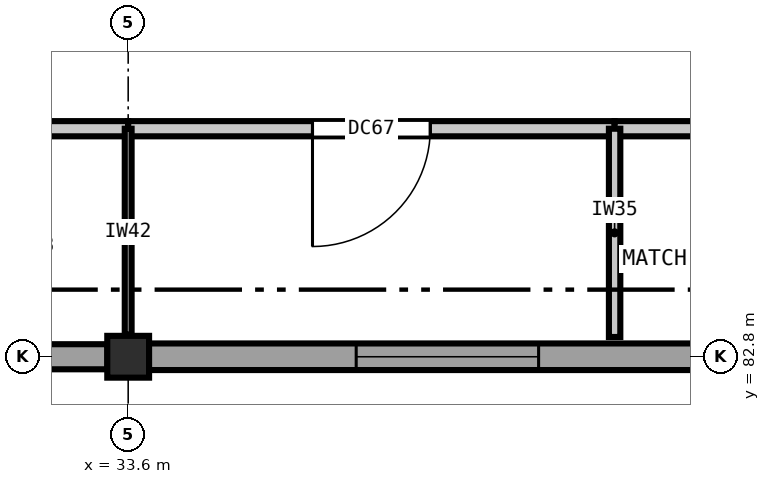
"""IFC4 building model, lengths in metres.
Left out: names, types, materials, properties, quantities, classifications, styles, units other than length and angle.
Written with IfcOpenShell. Run it as: python <this file> out.ifc"""

import sys

from ifc_helpers import new_model, si_unit, direction, frame, frame_2d, origin, origin_2d, place, context, subcontext, project, spatial, rectangle, extrude, element, fill, save


model = new_model("IFC4")
c1 = context("Model", 3, precision=1e-05, world=origin(), true_north=direction((0.0, 1.0)))
c2 = subcontext(c1, "Body", "Model", "MODEL_VIEW")
j1 = project(units=[si_unit("LENGTHUNIT", "METRE"), si_unit("PLANEANGLEUNIT", "RADIAN")], contexts=[c1])
p1 = place(None, origin())
s1 = spatial("IfcSite", under=j1, at=p1, CompositionType="ELEMENT")
p2 = place(p1, origin())
s2 = spatial("IfcBuilding", under=s1, at=p2, CompositionType="ELEMENT")
p3 = place(p2, frame((0.0, 0.0, 16.2)))
s3 = spatial("IfcBuildingStorey", under=s2, at=p3, CompositionType="ELEMENT", Elevation=16.2)
p4 = place(p3, frame((33.6, 82.8, 0.0), z_axis=(0.0, 0.0, 1.0), x_axis=(1.0, 0.0, 0.0)))
e1 = element("IfcColumn", 1, at=p4, inside=s3, PredefinedType="COLUMN", context=c2, shape_type="SweptSolid", body=[
    extrude(rectangle(XDim=0.55, YDim=0.55, at=origin_2d()), origin(), (0.0, 0.0, 1.0), 4.2),
])
p5 = place(p3, frame((41.727, 82.8, 0.0), z_axis=(0.0, 0.0, 1.0), x_axis=(-1.0, 0.0, 0.0)))
e2 = element("IfcWall", 2, at=p5, inside=s3, PredefinedType="SOLIDWALL", context=c2, shape_type="SweptSolid", body=[
    extrude(rectangle(XDim=7.854, YDim=0.35, at=frame_2d((3.927, 0.0))), origin(), (0.0, 0.0, 1.0), 3.48),
])
p6 = place(p5, frame((2.727, 0.0, 0.9)))
e3 = element("IfcOpeningElement", 3, at=p6, cuts=e2, PredefinedType="OPENING", context=c2, shape_type="SweptSolid", body=[
    extrude(rectangle(XDim=2.4, YDim=1.95, at=frame_2d((1.2, 0.975))), frame((0.0, 0.185, 0.0), z_axis=(0.0, -1.0, 0.0), x_axis=(1.0, 0.0, 0.0)), (0.0, 0.0, 1.0), 0.37),
])
p7 = place(p3, frame((33.327, 82.8, 0.0), z_axis=(0.0, 0.0, 1.0), x_axis=(-1.0, 0.0, 0.0)))
e4 = element("IfcWall", 4, at=p7, inside=s3, PredefinedType="SOLIDWALL", context=c2, shape_type="SweptSolid", body=[
    extrude(rectangle(XDim=7.854, YDim=0.33, at=frame_2d((3.927, 0.0))), origin(), (0.0, 0.0, 1.0), 3.48),
])
p8 = place(p7, frame((2.602, 0.0, 0.9)))
e5 = element("IfcOpeningElement", 5, at=p8, cuts=e4, PredefinedType="OPENING", context=c2, shape_type="SweptSolid", body=[
    extrude(rectangle(XDim=2.65, YDim=1.95, at=frame_2d((1.325, 0.975))), frame((0.0, 0.175, 0.0), z_axis=(0.0, -1.0, 0.0), x_axis=(1.0, 0.0, 0.0)), (0.0, 0.0, 1.0), 0.35),
])
p9 = place(p3, frame((25.2, 85.8, 0.0), z_axis=(0.0, 0.0, 1.0), x_axis=(1.0, 0.0, 0.0)))
e6 = element("IfcWall", 6, at=p9, inside=s3, PredefinedType="PARTITIONING", context=c2, shape_type="SweptSolid", body=[
    extrude(rectangle(XDim=8.4, YDim=0.2, at=frame_2d((4.2, 0.0))), origin(), (0.0, 0.0, 1.0), 3.89),
])
p10 = place(p9, frame((3.475, 0.0, 0.0)))
e7 = element("IfcOpeningElement", 7, at=p10, cuts=e6, PredefinedType="OPENING", context=c2, shape_type="SweptSolid", body=[
    extrude(rectangle(XDim=1.45, YDim=2.25, at=frame_2d((0.725, 1.125))), frame((0.0, 0.11, 0.0), z_axis=(0.0, -1.0, 0.0), x_axis=(1.0, 0.0, 0.0)), (0.0, 0.0, 1.0), 0.22),
])
p11 = place(p3, frame((33.6, 85.8, 0.0), z_axis=(0.0, 0.0, 1.0), x_axis=(1.0, 0.0, 0.0)))
e8 = element("IfcWall", 8, at=p11, inside=s3, PredefinedType="PARTITIONING", context=c2, shape_type="SweptSolid", body=[
    extrude(rectangle(XDim=6.4, YDim=0.2, at=frame_2d((3.2, 0.0))), origin(), (0.0, 0.0, 1.0), 3.89),
])
p12 = place(p11, frame((2.425, 0.0, 0.0)))
e9 = element("IfcOpeningElement", 9, at=p12, cuts=e8, PredefinedType="OPENING", context=c2, shape_type="SweptSolid", body=[
    extrude(rectangle(XDim=1.55, YDim=2.25, at=frame_2d((0.775, 1.125))), frame((0.0, 0.11, 0.0), z_axis=(0.0, -1.0, 0.0), x_axis=(1.0, 0.0, 0.0)), (0.0, 0.0, 1.0), 0.22),
])
p13 = place(p3, frame((40.0, 85.8, 0.0), z_axis=(0.0, 0.0, 1.0), x_axis=(1.0, 0.0, 0.0)))
e10 = element("IfcWall", 10, at=p13, inside=s3, PredefinedType="PARTITIONING", context=c2, shape_type="SweptSolid", body=[
    extrude(rectangle(XDim=8.4, YDim=0.2, at=frame_2d((4.2, 0.0))), origin(), (0.0, 0.0, 1.0), 3.89),
])
p14 = place(p13, frame((3.35, 0.0, 0.0)))
e11 = element("IfcOpeningElement", 11, at=p14, cuts=e10, PredefinedType="OPENING", context=c2, shape_type="SweptSolid", body=[
    extrude(rectangle(XDim=1.7, YDim=2.3, at=frame_2d((0.85, 1.15))), frame((0.0, 0.11, 0.0), z_axis=(0.0, -1.0, 0.0), x_axis=(1.0, 0.0, 0.0)), (0.0, 0.0, 1.0), 0.22),
])
p15 = place(p3, frame((33.6, 83.09, 0.0), z_axis=(0.0, 0.0, 1.0), x_axis=(0.0, 1.0, 0.0)))
e12 = element("IfcWall", 12, at=p15, inside=s3, PredefinedType="PARTITIONING", context=c2, shape_type="SweptSolid", body=[
    extrude(rectangle(XDim=2.71, YDim=0.09, at=frame_2d((1.355, 0.0))), origin(), (0.0, 0.0, 1.0), 3.585),
])
p16 = place(p3, frame((40.0, 83.06, 0.0), z_axis=(0.0, 0.0, 1.0), x_axis=(0.0, 1.0, 0.0)))
e13 = element("IfcWall", 13, at=p16, inside=s3, PredefinedType="PARTITIONING", context=c2, shape_type="SweptSolid", body=[
    extrude(rectangle(XDim=2.74, YDim=0.15, at=frame_2d((1.37, 0.0))), origin(), (0.0, 0.0, 1.0), 3.89),
])
p17 = place(p6, origin())
e14 = element("IfcWindow", 14, at=p17, inside=s3, PartitioningType="DOUBLE_PANEL_VERTICAL", PredefinedType="WINDOW", context=c2, shape_type="SweptSolid", body=[
    extrude(rectangle(XDim=2.4, YDim=1.95, at=frame_2d((1.2, 0.975))), frame((0.0, 0.03, 0.0), z_axis=(0.0, -1.0, 0.0), x_axis=(1.0, 0.0, 0.0)), (0.0, 0.0, 1.0), 0.06),
])
fill(e3, e14)
p18 = place(p12, frame((1.55, 0.0, 0.0), z_axis=(0.0, 0.0, 1.0), x_axis=(-1.0, 0.0, 0.0)))
e15 = element("IfcDoor", 15, at=p18, inside=s3, OperationType="SINGLE_SWING_RIGHT", PredefinedType="DOOR", context=c2, shape_type="SweptSolid", body=[
    extrude(rectangle(XDim=1.55, YDim=2.25, at=frame_2d((0.775, 1.125))), frame((0.0, 0.025, 0.0), z_axis=(0.0, -1.0, 0.0), x_axis=(1.0, 0.0, 0.0)), (0.0, 0.0, 1.0), 0.05),
])
fill(e9, e15)
save(model, sys.argv[1])
